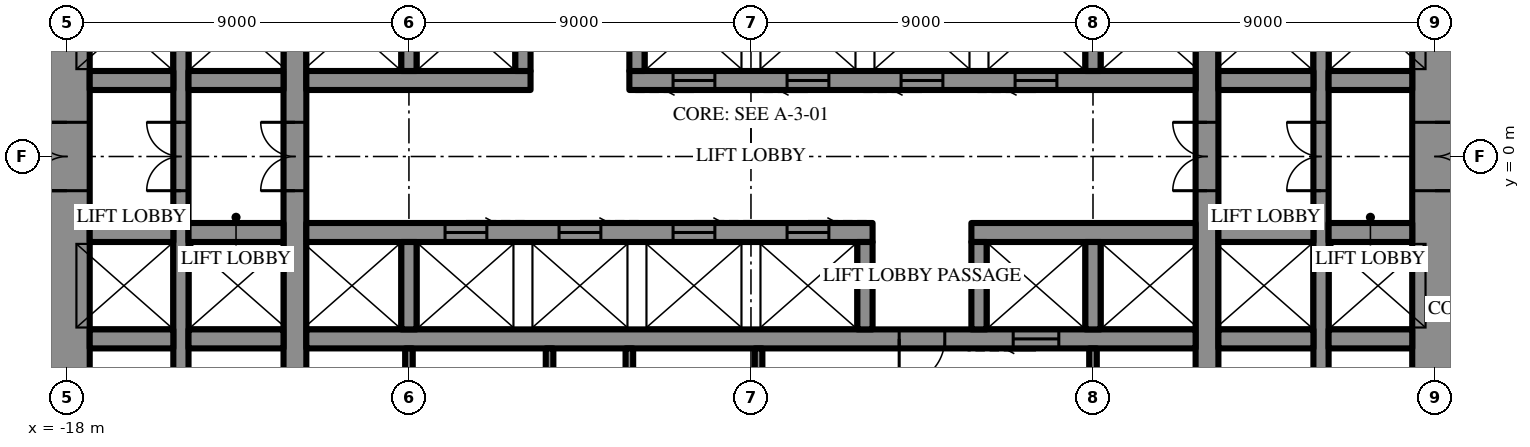
"""IFC4 building model, lengths in metres.
Left out: names, types, materials, properties, quantities, classifications, styles, units other than length and angle.
Written with IfcOpenShell. Run it as: python <this file> out.ifc"""

import sys

from ifc_helpers import new_model, si_unit, direction, frame, frame_2d, origin, place, context, subcontext, project, spatial, rectangle, extrude, element, fill, save


model = new_model("IFC4")
c1 = context("Model", 3, precision=1e-05, world=origin(), true_north=direction((0.0, 1.0)))
c2 = subcontext(c1, "Body", "Model", "MODEL_VIEW")
j1 = project(units=[si_unit("LENGTHUNIT", "METRE"), si_unit("PLANEANGLEUNIT", "RADIAN")], contexts=[c1])
p1 = place(None, origin())
s1 = spatial("IfcSite", under=j1, at=p1, CompositionType="ELEMENT")
p2 = place(p1, origin())
s2 = spatial("IfcBuilding", under=s1, at=p2, CompositionType="ELEMENT")
p3 = place(p2, frame((0.0, 0.0, 94.9)))
s3 = spatial("IfcBuildingStorey", under=s2, at=p3, CompositionType="ELEMENT", Elevation=94.9)
p4 = place(p3, frame((18.0, -10.7, 0.0), z_axis=(0.0, 0.0, 1.0), x_axis=(0.0, 1.0, 0.0)))
e1 = element("IfcWall", 1, at=p4, inside=s3, PredefinedType="SHEAR", context=c2, shape_type="SweptSolid", body=[
    extrude(rectangle(XDim=21.4, YDim=1.2, at=frame_2d((10.7, 0.0))), origin(), (0.0, 0.0, 1.0), 4.2),
])
p5 = place(p4, frame((9.8, 0.0, 0.0)))
e2 = element("IfcOpeningElement", 2, at=p5, cuts=e1, PredefinedType="OPENING", context=c2, shape_type="SweptSolid", body=[
    extrude(rectangle(XDim=1.8, YDim=2.4, at=frame_2d((0.9, 1.2))), frame((0.0, 0.61, 0.0), z_axis=(0.0, -1.0, 0.0), x_axis=(1.0, 0.0, 0.0)), (0.0, 0.0, 1.0), 1.22),
])
p6 = place(p3, frame((-18.0, 10.7, 0.0), z_axis=(0.0, 0.0, 1.0), x_axis=(0.0, -1.0, 0.0)))
e3 = element("IfcWall", 3, at=p6, inside=s3, PredefinedType="SHEAR", context=c2, shape_type="SweptSolid", body=[
    extrude(rectangle(XDim=21.4, YDim=1.2, at=frame_2d((10.7, 0.0))), origin(), (0.0, 0.0, 1.0), 4.2),
])
p7 = place(p6, frame((9.8, 0.0, 0.0)))
e4 = element("IfcOpeningElement", 4, at=p7, cuts=e3, PredefinedType="OPENING", context=c2, shape_type="SweptSolid", body=[
    extrude(rectangle(XDim=1.8, YDim=2.4, at=frame_2d((0.9, 1.2))), frame((0.0, 0.61, 0.0), z_axis=(0.0, -1.0, 0.0), x_axis=(1.0, 0.0, 0.0)), (0.0, 0.0, 1.0), 1.22),
])
p8 = place(p3, frame((12.0, -10.7, 0.0), z_axis=(0.0, 0.0, 1.0), x_axis=(0.0, 1.0, 0.0)))
e5 = element("IfcWall", 5, at=p8, inside=s3, PredefinedType="SHEAR", context=c2, shape_type="SweptSolid", body=[
    extrude(rectangle(XDim=21.4, YDim=0.6, at=frame_2d((10.7, 0.0))), origin(), (0.0, 0.0, 1.0), 4.2),
])
p9 = place(p8, frame((9.8, 0.0, 0.0)))
e6 = element("IfcOpeningElement", 6, at=p9, cuts=e5, PredefinedType="OPENING", context=c2, shape_type="SweptSolid", body=[
    extrude(rectangle(XDim=1.8, YDim=2.4, at=frame_2d((0.9, 1.2))), frame((0.0, 0.31, 0.0), z_axis=(0.0, -1.0, 0.0), x_axis=(1.0, 0.0, 0.0)), (0.0, 0.0, 1.0), 0.62),
])
p10 = place(p3, frame((-12.0, -10.7, 0.0), z_axis=(0.0, 0.0, 1.0), x_axis=(0.0, 1.0, 0.0)))
e7 = element("IfcWall", 7, at=p10, inside=s3, PredefinedType="SHEAR", context=c2, shape_type="SweptSolid", body=[
    extrude(rectangle(XDim=21.4, YDim=0.6, at=frame_2d((10.7, 0.0))), origin(), (0.0, 0.0, 1.0), 4.2),
])
p11 = place(p10, frame((9.8, 0.0, 0.0)))
e8 = element("IfcOpeningElement", 8, at=p11, cuts=e7, PredefinedType="OPENING", context=c2, shape_type="SweptSolid", body=[
    extrude(rectangle(XDim=1.8, YDim=2.4, at=frame_2d((0.9, 1.2))), frame((0.0, 0.31, 0.0), z_axis=(0.0, -1.0, 0.0), x_axis=(1.0, 0.0, 0.0)), (0.0, 0.0, 1.0), 0.62),
])
p12 = place(p3, frame((15.0, -10.7, 0.0), z_axis=(0.0, 0.0, 1.0), x_axis=(0.0, 1.0, 0.0)))
e9 = element("IfcWall", 9, at=p12, inside=s3, PredefinedType="SHEAR", context=c2, shape_type="SweptSolid", body=[
    extrude(rectangle(XDim=21.4, YDim=0.4, at=frame_2d((10.7, 0.0))), origin(), (0.0, 0.0, 1.0), 4.2),
])
p13 = place(p12, frame((9.8, 0.0, 0.0)))
e10 = element("IfcOpeningElement", 10, at=p13, cuts=e9, PredefinedType="OPENING", context=c2, shape_type="SweptSolid", body=[
    extrude(rectangle(XDim=1.8, YDim=2.4, at=frame_2d((0.9, 1.2))), frame((0.0, 0.21, 0.0), z_axis=(0.0, -1.0, 0.0), x_axis=(1.0, 0.0, 0.0)), (0.0, 0.0, 1.0), 0.42),
])
p14 = place(p3, frame((-15.0, -10.7, 0.0), z_axis=(0.0, 0.0, 1.0), x_axis=(0.0, 1.0, 0.0)))
e11 = element("IfcWall", 11, at=p14, inside=s3, PredefinedType="SHEAR", context=c2, shape_type="SweptSolid", body=[
    extrude(rectangle(XDim=21.4, YDim=0.4, at=frame_2d((10.7, 0.0))), origin(), (0.0, 0.0, 1.0), 4.2),
])
p15 = place(p14, frame((9.8, 0.0, 0.0)))
e12 = element("IfcOpeningElement", 12, at=p15, cuts=e11, PredefinedType="OPENING", context=c2, shape_type="SweptSolid", body=[
    extrude(rectangle(XDim=1.8, YDim=2.4, at=frame_2d((0.9, 1.2))), frame((0.0, 0.21, 0.0), z_axis=(0.0, -1.0, 0.0), x_axis=(1.0, 0.0, 0.0)), (0.0, 0.0, 1.0), 0.42),
])
p16 = place(p3, frame((-17.4, 2.0, 0.0), z_axis=(0.0, 0.0, 1.0), x_axis=(1.0, 0.0, 0.0)))
e13 = element("IfcWall", 13, at=p16, inside=s3, PredefinedType="SHEAR", context=c2, shape_type="SweptSolid", body=[
    extrude(rectangle(XDim=2.2, YDim=0.5, at=frame_2d((1.1, 0.0))), origin(), (0.0, 0.0, 1.0), 4.2),
])
p17 = place(p3, frame((-14.8, 2.0, 0.0), z_axis=(0.0, 0.0, 1.0), x_axis=(1.0, 0.0, 0.0)))
e14 = element("IfcWall", 14, at=p17, inside=s3, PredefinedType="SHEAR", context=c2, shape_type="SweptSolid", body=[
    extrude(rectangle(XDim=2.5, YDim=0.5, at=frame_2d((1.25, 0.0))), origin(), (0.0, 0.0, 1.0), 4.2),
])
p18 = place(p3, frame((-11.7, 2.0, 0.0), z_axis=(0.0, 0.0, 1.0), x_axis=(1.0, 0.0, 0.0)))
e15 = element("IfcWall", 15, at=p18, inside=s3, PredefinedType="SHEAR", context=c2, shape_type="SweptSolid", body=[
    extrude(rectangle(XDim=5.9, YDim=0.5, at=frame_2d((2.95, 0.0))), origin(), (0.0, 0.0, 1.0), 4.2),
])
p19 = place(p3, frame((-3.2, 2.0, 0.0), z_axis=(0.0, 0.0, 1.0), x_axis=(1.0, 0.0, 0.0)))
e16 = element("IfcWall", 16, at=p19, inside=s3, PredefinedType="SHEAR", context=c2, shape_type="SweptSolid", body=[
    extrude(rectangle(XDim=14.9, YDim=0.5, at=frame_2d((7.45, 0.0))), origin(), (0.0, 0.0, 1.0), 4.2),
])
p20 = place(p19, frame((1.15, 0.0, 0.0)))
e17 = element("IfcOpeningElement", 17, at=p20, cuts=e16, PredefinedType="OPENING", context=c2, shape_type="SweptSolid", body=[
    extrude(rectangle(XDim=1.1, YDim=2.2, at=frame_2d((0.55, 1.1))), frame((0.0, 0.26, 0.0), z_axis=(0.0, -1.0, 0.0), x_axis=(1.0, 0.0, 0.0)), (0.0, 0.0, 1.0), 0.52),
])
p21 = place(p19, frame((4.15, 0.0, 0.0)))
e18 = element("IfcOpeningElement", 18, at=p21, cuts=e16, PredefinedType="OPENING", context=c2, shape_type="SweptSolid", body=[
    extrude(rectangle(XDim=1.1, YDim=2.2, at=frame_2d((0.55, 1.1))), frame((0.0, 0.26, 0.0), z_axis=(0.0, -1.0, 0.0), x_axis=(1.0, 0.0, 0.0)), (0.0, 0.0, 1.0), 0.52),
])
p22 = place(p19, frame((7.15, 0.0, 0.0)))
e19 = element("IfcOpeningElement", 19, at=p22, cuts=e16, PredefinedType="OPENING", context=c2, shape_type="SweptSolid", body=[
    extrude(rectangle(XDim=1.1, YDim=2.2, at=frame_2d((0.55, 1.1))), frame((0.0, 0.26, 0.0), z_axis=(0.0, -1.0, 0.0), x_axis=(1.0, 0.0, 0.0)), (0.0, 0.0, 1.0), 0.52),
])
p23 = place(p19, frame((10.15, 0.0, 0.0)))
e20 = element("IfcOpeningElement", 20, at=p23, cuts=e16, PredefinedType="OPENING", context=c2, shape_type="SweptSolid", body=[
    extrude(rectangle(XDim=1.1, YDim=2.2, at=frame_2d((0.55, 1.1))), frame((0.0, 0.26, 0.0), z_axis=(0.0, -1.0, 0.0), x_axis=(1.0, 0.0, 0.0)), (0.0, 0.0, 1.0), 0.52),
])
p24 = place(p3, frame((12.3, 2.0, 0.0), z_axis=(0.0, 0.0, 1.0), x_axis=(1.0, 0.0, 0.0)))
e21 = element("IfcWall", 21, at=p24, inside=s3, PredefinedType="SHEAR", context=c2, shape_type="SweptSolid", body=[
    extrude(rectangle(XDim=2.5, YDim=0.5, at=frame_2d((1.25, 0.0))), origin(), (0.0, 0.0, 1.0), 4.2),
])
p25 = place(p3, frame((15.2, 2.0, 0.0), z_axis=(0.0, 0.0, 1.0), x_axis=(1.0, 0.0, 0.0)))
e22 = element("IfcWall", 22, at=p25, inside=s3, PredefinedType="SHEAR", context=c2, shape_type="SweptSolid", body=[
    extrude(rectangle(XDim=2.2, YDim=0.5, at=frame_2d((1.1, 0.0))), origin(), (0.0, 0.0, 1.0), 4.2),
])
for number, where, z_axis, x_axis in (
    (23, (-9.0, 2.25, 0.0), (0.0, 0.0, 1.0), (0.0, 1.0, 0.0)),
    (24, (-6.0, 2.25, 0.0), (0.0, 0.0, 1.0), (0.0, 1.0, 0.0)),
    (25, (-3.0, 2.25, 0.0), (0.0, 0.0, 1.0), (0.0, 1.0, 0.0)),
    (26, (9.0, 2.25, 0.0), (0.0, 0.0, 1.0), (0.0, 1.0, 0.0)),
):
    element("IfcWall", number, at=place(p3, frame(where, z_axis=z_axis, x_axis=x_axis)), inside=s3, PredefinedType="SHEAR", context=c2, shape_type="SweptSolid", body=[
        extrude(rectangle(XDim=2.3, YDim=0.4, at=frame_2d((1.15, 0.0))), origin(), (0.0, 0.0, 1.0), 4.2),
    ])
p26 = place(p3, frame((17.4, -2.0, 0.0), z_axis=(0.0, 0.0, 1.0), x_axis=(-1.0, 0.0, 0.0)))
e27 = element("IfcWall", 27, at=p26, inside=s3, PredefinedType="SHEAR", context=c2, shape_type="SweptSolid", body=[
    extrude(rectangle(XDim=2.2, YDim=0.5, at=frame_2d((1.1, 0.0))), origin(), (0.0, 0.0, 1.0), 4.2),
])
p27 = place(p3, frame((14.8, -2.0, 0.0), z_axis=(0.0, 0.0, 1.0), x_axis=(-1.0, 0.0, 0.0)))
e28 = element("IfcWall", 28, at=p27, inside=s3, PredefinedType="SHEAR", context=c2, shape_type="SweptSolid", body=[
    extrude(rectangle(XDim=2.5, YDim=0.5, at=frame_2d((1.25, 0.0))), origin(), (0.0, 0.0, 1.0), 4.2),
])
p28 = place(p3, frame((11.7, -2.0, 0.0), z_axis=(0.0, 0.0, 1.0), x_axis=(-1.0, 0.0, 0.0)))
e29 = element("IfcWall", 29, at=p28, inside=s3, PredefinedType="SHEAR", context=c2, shape_type="SweptSolid", body=[
    extrude(rectangle(XDim=5.9, YDim=0.5, at=frame_2d((2.95, 0.0))), origin(), (0.0, 0.0, 1.0), 4.2),
])
p29 = place(p3, frame((3.2, -2.0, 0.0), z_axis=(0.0, 0.0, 1.0), x_axis=(-1.0, 0.0, 0.0)))
e30 = element("IfcWall", 30, at=p29, inside=s3, PredefinedType="SHEAR", context=c2, shape_type="SweptSolid", body=[
    extrude(rectangle(XDim=14.9, YDim=0.5, at=frame_2d((7.45, 0.0))), origin(), (0.0, 0.0, 1.0), 4.2),
])
p30 = place(p29, frame((1.15, 0.0, 0.0)))
e31 = element("IfcOpeningElement", 31, at=p30, cuts=e30, PredefinedType="OPENING", context=c2, shape_type="SweptSolid", body=[
    extrude(rectangle(XDim=1.1, YDim=2.2, at=frame_2d((0.55, 1.1))), frame((0.0, 0.26, 0.0), z_axis=(0.0, -1.0, 0.0), x_axis=(1.0, 0.0, 0.0)), (0.0, 0.0, 1.0), 0.52),
])
p31 = place(p29, frame((4.15, 0.0, 0.0)))
e32 = element("IfcOpeningElement", 32, at=p31, cuts=e30, PredefinedType="OPENING", context=c2, shape_type="SweptSolid", body=[
    extrude(rectangle(XDim=1.1, YDim=2.2, at=frame_2d((0.55, 1.1))), frame((0.0, 0.26, 0.0), z_axis=(0.0, -1.0, 0.0), x_axis=(1.0, 0.0, 0.0)), (0.0, 0.0, 1.0), 0.52),
])
p32 = place(p29, frame((7.15, 0.0, 0.0)))
e33 = element("IfcOpeningElement", 33, at=p32, cuts=e30, PredefinedType="OPENING", context=c2, shape_type="SweptSolid", body=[
    extrude(rectangle(XDim=1.1, YDim=2.2, at=frame_2d((0.55, 1.1))), frame((0.0, 0.26, 0.0), z_axis=(0.0, -1.0, 0.0), x_axis=(1.0, 0.0, 0.0)), (0.0, 0.0, 1.0), 0.52),
])
p33 = place(p29, frame((10.15, 0.0, 0.0)))
e34 = element("IfcOpeningElement", 34, at=p33, cuts=e30, PredefinedType="OPENING", context=c2, shape_type="SweptSolid", body=[
    extrude(rectangle(XDim=1.1, YDim=2.2, at=frame_2d((0.55, 1.1))), frame((0.0, 0.26, 0.0), z_axis=(0.0, -1.0, 0.0), x_axis=(1.0, 0.0, 0.0)), (0.0, 0.0, 1.0), 0.52),
])
p34 = place(p3, frame((-12.3, -2.0, 0.0), z_axis=(0.0, 0.0, 1.0), x_axis=(-1.0, 0.0, 0.0)))
e35 = element("IfcWall", 35, at=p34, inside=s3, PredefinedType="SHEAR", context=c2, shape_type="SweptSolid", body=[
    extrude(rectangle(XDim=2.5, YDim=0.5, at=frame_2d((1.25, 0.0))), origin(), (0.0, 0.0, 1.0), 4.2),
])
for number, where, z_axis, x_axis in (
    (36, (-15.2, -2.0, 0.0), (0.0, 0.0, 1.0), (-1.0, 0.0, 0.0)),
    (37, (17.4, -4.8, 0.0), (0.0, 0.0, 1.0), (-1.0, 0.0, 0.0)),
):
    element("IfcWall", number, at=place(p3, frame(where, z_axis=z_axis, x_axis=x_axis)), inside=s3, PredefinedType="SHEAR", context=c2, shape_type="SweptSolid", body=[
        extrude(rectangle(XDim=2.2, YDim=0.5, at=frame_2d((1.1, 0.0))), origin(), (0.0, 0.0, 1.0), 4.2),
    ])
p35 = place(p3, frame((14.8, -4.8, 0.0), z_axis=(0.0, 0.0, 1.0), x_axis=(-1.0, 0.0, 0.0)))
e38 = element("IfcWall", 38, at=p35, inside=s3, PredefinedType="SHEAR", context=c2, shape_type="SweptSolid", body=[
    extrude(rectangle(XDim=2.5, YDim=0.5, at=frame_2d((1.25, 0.0))), origin(), (0.0, 0.0, 1.0), 4.2),
])
p36 = place(p3, frame((11.7, -4.8, 0.0), z_axis=(0.0, 0.0, 1.0), x_axis=(-1.0, 0.0, 0.0)))
e39 = element("IfcWall", 39, at=p36, inside=s3, PredefinedType="SHEAR", context=c2, shape_type="SweptSolid", body=[
    extrude(rectangle(XDim=23.4, YDim=0.5, at=frame_2d((11.7, 0.0))), origin(), (0.0, 0.0, 1.0), 4.2),
])
p37 = place(p36, frame((6.6, 0.0, 0.0)))
e40 = element("IfcOpeningElement", 40, at=p37, cuts=e39, PredefinedType="OPENING", context=c2, shape_type="SweptSolid", body=[
    extrude(rectangle(XDim=1.2, YDim=2.2, at=frame_2d((0.6, 1.1))), frame((0.0, 0.26, 0.0), z_axis=(0.0, -1.0, 0.0), x_axis=(1.0, 0.0, 0.0)), (0.0, 0.0, 1.0), 0.52),
])
p38 = place(p36, frame((3.6, 0.0, 0.0)))
e41 = element("IfcOpeningElement", 41, at=p38, cuts=e39, PredefinedType="OPENING", context=c2, shape_type="SweptSolid", body=[
    extrude(rectangle(XDim=1.2, YDim=2.2, at=frame_2d((0.6, 1.1))), frame((0.0, 0.26, 0.0), z_axis=(0.0, -1.0, 0.0), x_axis=(1.0, 0.0, 0.0)), (0.0, 0.0, 1.0), 0.52),
])
p39 = place(p3, frame((-12.3, -4.8, 0.0), z_axis=(0.0, 0.0, 1.0), x_axis=(-1.0, 0.0, 0.0)))
e42 = element("IfcWall", 42, at=p39, inside=s3, PredefinedType="SHEAR", context=c2, shape_type="SweptSolid", body=[
    extrude(rectangle(XDim=2.5, YDim=0.5, at=frame_2d((1.25, 0.0))), origin(), (0.0, 0.0, 1.0), 4.2),
])
p40 = place(p3, frame((-15.2, -4.8, 0.0), z_axis=(0.0, 0.0, 1.0), x_axis=(-1.0, 0.0, 0.0)))
e43 = element("IfcWall", 43, at=p40, inside=s3, PredefinedType="SHEAR", context=c2, shape_type="SweptSolid", body=[
    extrude(rectangle(XDim=2.2, YDim=0.5, at=frame_2d((1.1, 0.0))), origin(), (0.0, 0.0, 1.0), 4.2),
])
for number, where, z_axis, x_axis in (
    (44, (9.0, -2.25, 0.0), (0.0, 0.0, 1.0), (0.0, -1.0, 0.0)),
    (45, (6.0, -2.25, 0.0), (0.0, 0.0, 1.0), (0.0, -1.0, 0.0)),
    (46, (3.0, -2.25, 0.0), (0.0, 0.0, 1.0), (0.0, -1.0, 0.0)),
    (47, (-9.0, -2.25, 0.0), (0.0, 0.0, 1.0), (0.0, -1.0, 0.0)),
):
    element("IfcWall", number, at=place(p3, frame(where, z_axis=z_axis, x_axis=x_axis)), inside=s3, PredefinedType="SHEAR", context=c2, shape_type="SweptSolid", body=[
        extrude(rectangle(XDim=2.3, YDim=0.4, at=frame_2d((1.15, 0.0))), origin(), (0.0, 0.0, 1.0), 4.2),
    ])
p41 = place(p3, frame((0.2, -5.05, 0.0), z_axis=(0.0, 0.0, 1.0), x_axis=(0.0, -1.0, 0.0)))
e48 = element("IfcWall", 48, at=p41, inside=s3, PredefinedType="SHEAR", context=c2, shape_type="SweptSolid", body=[
    extrude(rectangle(XDim=5.65, YDim=0.2, at=frame_2d((2.825, 0.0))), origin(), (0.0, 0.0, 1.0), 4.2),
])
for number, where, z_axis, x_axis in (
    (49, (9.0, -5.05, 0.0), (0.0, 0.0, 1.0), (0.0, -1.0, 0.0)),
    (50, (-9.0, -5.05, 0.0), (0.0, 0.0, 1.0), (0.0, -1.0, 0.0)),
    (51, (-3.2, -5.05, 0.0), (0.0, 0.0, 1.0), (0.0, -1.0, 0.0)),
    (52, (-5.3, -5.05, 0.0), (0.0, 0.0, 1.0), (0.0, -1.0, 0.0)),
):
    element("IfcWall", number, at=place(p3, frame(where, z_axis=z_axis, x_axis=x_axis)), inside=s3, PredefinedType="PARTITIONING", context=c2, shape_type="SweptSolid", body=[
        extrude(rectangle(XDim=5.65, YDim=0.2, at=frame_2d((2.825, 0.0))), origin(), (0.0, 0.0, 1.0), 4.0),
    ])
p42 = place(p5, frame((1.8, 0.0, 0.0), z_axis=(0.0, 0.0, 1.0), x_axis=(-1.0, 0.0, 0.0)))
e53 = element("IfcDoor", 53, at=p42, inside=s3, OperationType="DOUBLE_DOOR_SINGLE_SWING", PredefinedType="DOOR", context=c2, shape_type="SweptSolid", body=[
    extrude(rectangle(XDim=1.8, YDim=2.4, at=frame_2d((0.9, 1.2))), frame((0.0, 0.025, 0.0), z_axis=(0.0, -1.0, 0.0), x_axis=(1.0, 0.0, 0.0)), (0.0, 0.0, 1.0), 0.05),
])
fill(e2, e53)
p43 = place(p7, frame((1.8, 0.0, 0.0), z_axis=(0.0, 0.0, 1.0), x_axis=(-1.0, 0.0, 0.0)))
e54 = element("IfcDoor", 54, at=p43, inside=s3, OperationType="DOUBLE_DOOR_SINGLE_SWING", PredefinedType="DOOR", context=c2, shape_type="SweptSolid", body=[
    extrude(rectangle(XDim=1.8, YDim=2.4, at=frame_2d((0.9, 1.2))), frame((0.0, 0.025, 0.0), z_axis=(0.0, -1.0, 0.0), x_axis=(1.0, 0.0, 0.0)), (0.0, 0.0, 1.0), 0.05),
])
fill(e4, e54)
p44 = place(p37, origin())
e55 = element("IfcDoor", 55, at=p44, inside=s3, OperationType="SINGLE_SWING_LEFT", PredefinedType="DOOR", context=c2, shape_type="SweptSolid", body=[
    extrude(rectangle(XDim=1.2, YDim=2.2, at=frame_2d((0.6, 1.1))), frame((0.0, 0.025, 0.0), z_axis=(0.0, -1.0, 0.0), x_axis=(1.0, 0.0, 0.0)), (0.0, 0.0, 1.0), 0.05),
])
fill(e40, e55)
p45 = place(p9, origin())
e56 = element("IfcDoor", 56, at=p45, inside=s3, OperationType="DOUBLE_DOOR_SINGLE_SWING", PredefinedType="DOOR", context=c2, shape_type="SweptSolid", body=[
    extrude(rectangle(XDim=1.8, YDim=2.4, at=frame_2d((0.9, 1.2))), frame((0.0, 0.025, 0.0), z_axis=(0.0, -1.0, 0.0), x_axis=(1.0, 0.0, 0.0)), (0.0, 0.0, 1.0), 0.05),
])
fill(e6, e56)
p46 = place(p11, origin())
e57 = element("IfcDoor", 57, at=p46, inside=s3, OperationType="DOUBLE_DOOR_SINGLE_SWING", PredefinedType="DOOR", context=c2, shape_type="SweptSolid", body=[
    extrude(rectangle(XDim=1.8, YDim=2.4, at=frame_2d((0.9, 1.2))), frame((0.0, 0.025, 0.0), z_axis=(0.0, -1.0, 0.0), x_axis=(1.0, 0.0, 0.0)), (0.0, 0.0, 1.0), 0.05),
])
fill(e8, e57)
p47 = place(p13, origin())
e58 = element("IfcDoor", 58, at=p47, inside=s3, OperationType="DOUBLE_DOOR_SINGLE_SWING", PredefinedType="DOOR", context=c2, shape_type="SweptSolid", body=[
    extrude(rectangle(XDim=1.8, YDim=2.4, at=frame_2d((0.9, 1.2))), frame((0.0, 0.025, 0.0), z_axis=(0.0, -1.0, 0.0), x_axis=(1.0, 0.0, 0.0)), (0.0, 0.0, 1.0), 0.05),
])
fill(e10, e58)
p48 = place(p15, origin())
e59 = element("IfcDoor", 59, at=p48, inside=s3, OperationType="DOUBLE_DOOR_SINGLE_SWING", PredefinedType="DOOR", context=c2, shape_type="SweptSolid", body=[
    extrude(rectangle(XDim=1.8, YDim=2.4, at=frame_2d((0.9, 1.2))), frame((0.0, 0.025, 0.0), z_axis=(0.0, -1.0, 0.0), x_axis=(1.0, 0.0, 0.0)), (0.0, 0.0, 1.0), 0.05),
])
fill(e12, e59)
p49 = place(p20, frame((1.1, 0.0, 0.0), z_axis=(0.0, 0.0, 1.0), x_axis=(-1.0, 0.0, 0.0)))
e60 = element("IfcDoor", 60, at=p49, inside=s3, OperationType="SLIDING_TO_LEFT", PredefinedType="DOOR", context=c2, shape_type="SweptSolid", body=[
    extrude(rectangle(XDim=1.1, YDim=2.2, at=frame_2d((0.55, 1.1))), frame((0.0, 0.025, 0.0), z_axis=(0.0, -1.0, 0.0), x_axis=(1.0, 0.0, 0.0)), (0.0, 0.0, 1.0), 0.05),
])
fill(e17, e60)
p50 = place(p21, frame((1.1, 0.0, 0.0), z_axis=(0.0, 0.0, 1.0), x_axis=(-1.0, 0.0, 0.0)))
e61 = element("IfcDoor", 61, at=p50, inside=s3, OperationType="SLIDING_TO_LEFT", PredefinedType="DOOR", context=c2, shape_type="SweptSolid", body=[
    extrude(rectangle(XDim=1.1, YDim=2.2, at=frame_2d((0.55, 1.1))), frame((0.0, 0.025, 0.0), z_axis=(0.0, -1.0, 0.0), x_axis=(1.0, 0.0, 0.0)), (0.0, 0.0, 1.0), 0.05),
])
fill(e18, e61)
p51 = place(p22, frame((1.1, 0.0, 0.0), z_axis=(0.0, 0.0, 1.0), x_axis=(-1.0, 0.0, 0.0)))
e62 = element("IfcDoor", 62, at=p51, inside=s3, OperationType="SLIDING_TO_LEFT", PredefinedType="DOOR", context=c2, shape_type="SweptSolid", body=[
    extrude(rectangle(XDim=1.1, YDim=2.2, at=frame_2d((0.55, 1.1))), frame((0.0, 0.025, 0.0), z_axis=(0.0, -1.0, 0.0), x_axis=(1.0, 0.0, 0.0)), (0.0, 0.0, 1.0), 0.05),
])
fill(e19, e62)
p52 = place(p23, frame((1.1, 0.0, 0.0), z_axis=(0.0, 0.0, 1.0), x_axis=(-1.0, 0.0, 0.0)))
e63 = element("IfcDoor", 63, at=p52, inside=s3, OperationType="SLIDING_TO_LEFT", PredefinedType="DOOR", context=c2, shape_type="SweptSolid", body=[
    extrude(rectangle(XDim=1.1, YDim=2.2, at=frame_2d((0.55, 1.1))), frame((0.0, 0.025, 0.0), z_axis=(0.0, -1.0, 0.0), x_axis=(1.0, 0.0, 0.0)), (0.0, 0.0, 1.0), 0.05),
])
fill(e20, e63)
p53 = place(p38, origin())
e64 = element("IfcDoor", 64, at=p53, inside=s3, OperationType="SLIDING_TO_LEFT", PredefinedType="DOOR", context=c2, shape_type="SweptSolid", body=[
    extrude(rectangle(XDim=1.2, YDim=2.2, at=frame_2d((0.6, 1.1))), frame((0.0, 0.025, 0.0), z_axis=(0.0, -1.0, 0.0), x_axis=(1.0, 0.0, 0.0)), (0.0, 0.0, 1.0), 0.05),
])
fill(e41, e64)
p54 = place(p30, frame((1.1, 0.0, 0.0), z_axis=(0.0, 0.0, 1.0), x_axis=(-1.0, 0.0, 0.0)))
e65 = element("IfcDoor", 65, at=p54, inside=s3, OperationType="SLIDING_TO_LEFT", PredefinedType="DOOR", context=c2, shape_type="SweptSolid", body=[
    extrude(rectangle(XDim=1.1, YDim=2.2, at=frame_2d((0.55, 1.1))), frame((0.0, 0.025, 0.0), z_axis=(0.0, -1.0, 0.0), x_axis=(1.0, 0.0, 0.0)), (0.0, 0.0, 1.0), 0.05),
])
fill(e31, e65)
p55 = place(p31, frame((1.1, 0.0, 0.0), z_axis=(0.0, 0.0, 1.0), x_axis=(-1.0, 0.0, 0.0)))
e66 = element("IfcDoor", 66, at=p55, inside=s3, OperationType="SLIDING_TO_LEFT", PredefinedType="DOOR", context=c2, shape_type="SweptSolid", body=[
    extrude(rectangle(XDim=1.1, YDim=2.2, at=frame_2d((0.55, 1.1))), frame((0.0, 0.025, 0.0), z_axis=(0.0, -1.0, 0.0), x_axis=(1.0, 0.0, 0.0)), (0.0, 0.0, 1.0), 0.05),
])
fill(e32, e66)
p56 = place(p32, frame((1.1, 0.0, 0.0), z_axis=(0.0, 0.0, 1.0), x_axis=(-1.0, 0.0, 0.0)))
e67 = element("IfcDoor", 67, at=p56, inside=s3, OperationType="SLIDING_TO_LEFT", PredefinedType="DOOR", context=c2, shape_type="SweptSolid", body=[
    extrude(rectangle(XDim=1.1, YDim=2.2, at=frame_2d((0.55, 1.1))), frame((0.0, 0.025, 0.0), z_axis=(0.0, -1.0, 0.0), x_axis=(1.0, 0.0, 0.0)), (0.0, 0.0, 1.0), 0.05),
])
fill(e33, e67)
p57 = place(p33, frame((1.1, 0.0, 0.0), z_axis=(0.0, 0.0, 1.0), x_axis=(-1.0, 0.0, 0.0)))
e68 = element("IfcDoor", 68, at=p57, inside=s3, OperationType="SLIDING_TO_LEFT", PredefinedType="DOOR", context=c2, shape_type="SweptSolid", body=[
    extrude(rectangle(XDim=1.1, YDim=2.2, at=frame_2d((0.55, 1.1))), frame((0.0, 0.025, 0.0), z_axis=(0.0, -1.0, 0.0), x_axis=(1.0, 0.0, 0.0)), (0.0, 0.0, 1.0), 0.05),
])
fill(e34, e68)
save(model, sys.argv[1])
